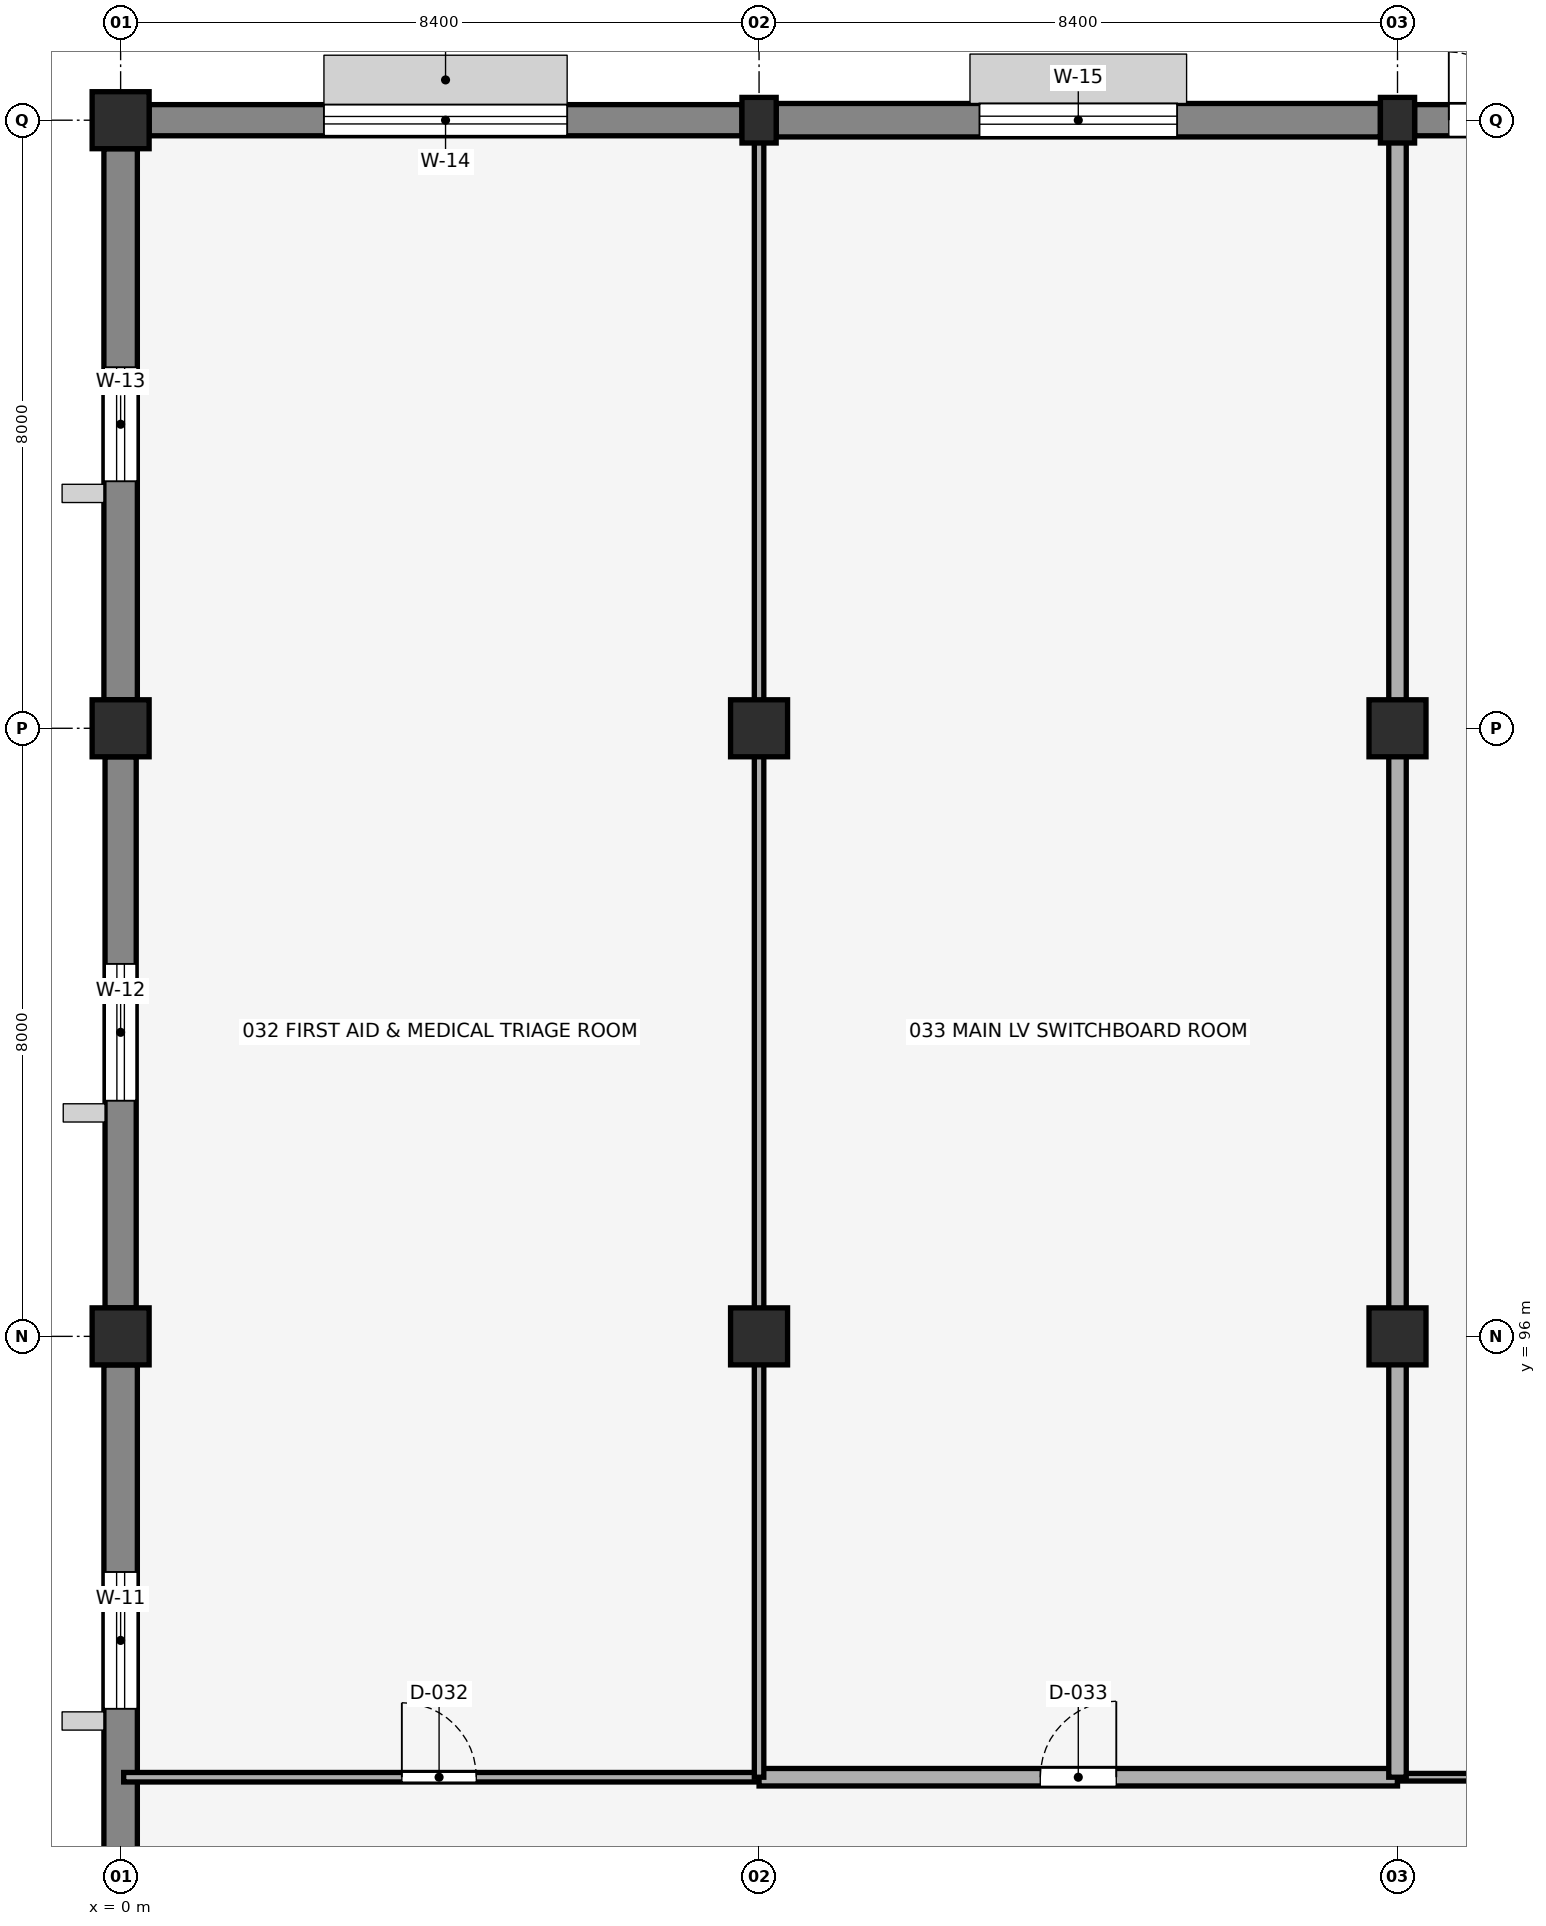
"""IFC4 building model, lengths in metres.
Left out: names, types, materials, properties, quantities, classifications, styles, units other than length and angle.
Written with IfcOpenShell. Run it as: python <this file> out.ifc"""

import sys

from ifc_helpers import new_model, si_unit, direction, frame, frame_2d, origin, origin_2d, place, context, subcontext, project, spatial, rectangle, extrude, element, fill, save


model = new_model("IFC4")
c1 = context("Model", 3, precision=1e-05, world=origin(), true_north=direction((0.0, 1.0)))
c2 = subcontext(c1, "Body", "Model", "MODEL_VIEW")
j1 = project(units=[si_unit("LENGTHUNIT", "METRE"), si_unit("PLANEANGLEUNIT", "RADIAN")], contexts=[c1])
p1 = place(None, origin())
s1 = spatial("IfcSite", under=j1, at=p1, CompositionType="ELEMENT")
p2 = place(p1, origin())
s2 = spatial("IfcBuilding", under=s1, at=p2, CompositionType="ELEMENT")
p3 = place(p2, origin())
s3 = spatial("IfcBuildingStorey", under=s2, at=p3, CompositionType="ELEMENT", Elevation=0.0)
for number, where, z_axis, x_axis in (
    (1, (0.0, 96.0, 0.0), (0.0, 0.0, 1.0), (1.0, 0.0, 0.0)),
    (2, (0.0, 104.0, 0.0), (0.0, 0.0, 1.0), (1.0, 0.0, 0.0)),
    (3, (0.0, 112.0, 0.0), (0.0, 0.0, 1.0), (1.0, 0.0, 0.0)),
    (4, (8.4, 96.0, 0.0), (0.0, 0.0, 1.0), (1.0, 0.0, 0.0)),
    (5, (8.4, 104.0, 0.0), (0.0, 0.0, 1.0), (1.0, 0.0, 0.0)),
):
    element("IfcColumn", number, at=place(p3, frame(where, z_axis=z_axis, x_axis=x_axis)), inside=s3, PredefinedType="COLUMN", context=c2, shape_type="SweptSolid", body=[
        extrude(rectangle(XDim=0.75, YDim=0.75, at=origin_2d()), origin(), (0.0, 0.0, 1.0), 5.15),
    ])
p4 = place(p3, frame((8.4, 112.0, 0.0), z_axis=(0.0, 0.0, 1.0), x_axis=(1.0, 0.0, 0.0)))
e6 = element("IfcColumn", 6, at=p4, inside=s3, PredefinedType="PILASTER", context=c2, shape_type="SweptSolid", body=[
    extrude(rectangle(XDim=0.45, YDim=0.6, at=origin_2d()), origin(), (0.0, 0.0, 1.0), 5.15),
])
for number, where, z_axis, x_axis in (
    (7, (16.8, 96.0, 0.0), (0.0, 0.0, 1.0), (1.0, 0.0, 0.0)),
    (8, (16.8, 104.0, 0.0), (0.0, 0.0, 1.0), (1.0, 0.0, 0.0)),
):
    element("IfcColumn", number, at=place(p3, frame(where, z_axis=z_axis, x_axis=x_axis)), inside=s3, PredefinedType="COLUMN", context=c2, shape_type="SweptSolid", body=[
        extrude(rectangle(XDim=0.75, YDim=0.75, at=origin_2d()), origin(), (0.0, 0.0, 1.0), 5.15),
    ])
p5 = place(p3, frame((16.8, 112.0, 0.0), z_axis=(0.0, 0.0, 1.0), x_axis=(1.0, 0.0, 0.0)))
e9 = element("IfcColumn", 9, at=p5, inside=s3, PredefinedType="PILASTER", context=c2, shape_type="SweptSolid", body=[
    extrude(rectangle(XDim=0.45, YDim=0.6, at=origin_2d()), origin(), (0.0, 0.0, 1.0), 5.15),
])
p6 = place(p3, frame((0.0, 88.375, 0.0), z_axis=(0.0, 0.0, 1.0), x_axis=(0.0, 1.0, 0.0)))
e10 = element("IfcWall", 10, at=p6, inside=s3, PredefinedType="SOLIDWALL", context=c2, shape_type="SweptSolid", body=[
    extrude(rectangle(XDim=7.25, YDim=0.44, at=frame_2d((3.625, 0.0))), origin(), (0.0, 0.0, 1.0), 4.747),
])
p7 = place(p6, frame((2.725, 0.0, 0.9), z_axis=(0.0, 0.0, 1.0), x_axis=(1.0, 0.0, 0.0)))
e11 = element("IfcOpeningElement", 11, at=p7, cuts=e10, PredefinedType="OPENING", context=c2, shape_type="SweptSolid", body=[
    extrude(rectangle(XDim=1.8, YDim=1.45, at=frame_2d((0.9, 0.725))), frame((0.0, 0.23, 0.0), z_axis=(0.0, -1.0, 0.0), x_axis=(1.0, 0.0, 0.0)), (0.0, 0.0, 1.0), 0.46),
])
p8 = place(p3, frame((0.0, 96.375, 0.0), z_axis=(0.0, 0.0, 1.0), x_axis=(0.0, 1.0, 0.0)))
e12 = element("IfcWall", 12, at=p8, inside=s3, PredefinedType="SOLIDWALL", context=c2, shape_type="SweptSolid", body=[
    extrude(rectangle(XDim=7.25, YDim=0.41, at=frame_2d((3.625, 0.0))), origin(), (0.0, 0.0, 1.0), 4.747),
])
p9 = place(p8, frame((2.725, 0.0, 0.9), z_axis=(0.0, 0.0, 1.0), x_axis=(1.0, 0.0, 0.0)))
e13 = element("IfcOpeningElement", 13, at=p9, cuts=e12, PredefinedType="OPENING", context=c2, shape_type="SweptSolid", body=[
    extrude(rectangle(XDim=1.8, YDim=1.3, at=frame_2d((0.9, 0.65))), frame((0.0, 0.215, 0.0), z_axis=(0.0, -1.0, 0.0), x_axis=(1.0, 0.0, 0.0)), (0.0, 0.0, 1.0), 0.43),
])
p10 = place(p3, frame((0.0, 104.375, 0.0), z_axis=(0.0, 0.0, 1.0), x_axis=(0.0, 1.0, 0.0)))
e14 = element("IfcWall", 14, at=p10, inside=s3, PredefinedType="SOLIDWALL", context=c2, shape_type="SweptSolid", body=[
    extrude(rectangle(XDim=7.25, YDim=0.44, at=frame_2d((3.625, 0.0))), origin(), (0.0, 0.0, 1.0), 4.747),
])
p11 = place(p10, frame((2.875, 0.0, 0.9), z_axis=(0.0, 0.0, 1.0), x_axis=(1.0, 0.0, 0.0)))
e15 = element("IfcOpeningElement", 15, at=p11, cuts=e14, PredefinedType="OPENING", context=c2, shape_type="SweptSolid", body=[
    extrude(rectangle(XDim=1.5, YDim=1.4, at=frame_2d((0.75, 0.7))), frame((0.0, 0.23, 0.0), z_axis=(0.0, -1.0, 0.0), x_axis=(1.0, 0.0, 0.0)), (0.0, 0.0, 1.0), 0.46),
])
p12 = place(p3, frame((0.375, 112.0, 0.0), z_axis=(0.0, 0.0, 1.0), x_axis=(1.0, 0.0, 0.0)))
e16 = element("IfcWall", 16, at=p12, inside=s3, PredefinedType="SOLIDWALL", context=c2, shape_type="SweptSolid", body=[
    extrude(rectangle(XDim=7.8, YDim=0.41, at=frame_2d((3.9, 0.0))), origin(), (0.0, 0.0, 1.0), 4.74),
])
p13 = place(p12, frame((2.3, 0.0, 1.55), z_axis=(0.0, 0.0, 1.0), x_axis=(1.0, 0.0, 0.0)))
e17 = element("IfcOpeningElement", 17, at=p13, cuts=e16, PredefinedType="OPENING", context=c2, shape_type="SweptSolid", body=[
    extrude(rectangle(XDim=3.2, YDim=0.9, at=frame_2d((1.6, 0.45))), frame((0.0, 0.215, 0.0), z_axis=(0.0, -1.0, 0.0), x_axis=(1.0, 0.0, 0.0)), (0.0, 0.0, 1.0), 0.43),
])
p14 = place(p3, frame((8.625, 112.0, 0.0), z_axis=(0.0, 0.0, 1.0), x_axis=(1.0, 0.0, 0.0)))
e18 = element("IfcWall", 18, at=p14, inside=s3, PredefinedType="SOLIDWALL", context=c2, shape_type="SweptSolid", body=[
    extrude(rectangle(XDim=7.95, YDim=0.44, at=frame_2d((3.975, 0.0))), origin(), (0.0, 0.0, 1.0), 4.74),
])
p15 = place(p14, frame((2.675, 0.0, 1.55), z_axis=(0.0, 0.0, 1.0), x_axis=(1.0, 0.0, 0.0)))
e19 = element("IfcOpeningElement", 19, at=p15, cuts=e18, PredefinedType="OPENING", context=c2, shape_type="SweptSolid", body=[
    extrude(rectangle(XDim=2.6, YDim=0.85, at=frame_2d((1.3, 0.425))), frame((0.0, 0.23, 0.0), z_axis=(0.0, -1.0, 0.0), x_axis=(1.0, 0.0, 0.0)), (0.0, 0.0, 1.0), 0.46),
])
p16 = place(p3, frame((17.025, 112.0, 0.0), z_axis=(0.0, 0.0, 1.0), x_axis=(1.0, 0.0, 0.0)))
e20 = element("IfcWall", 20, at=p16, inside=s3, PredefinedType="SOLIDWALL", context=c2, shape_type="SweptSolid", body=[
    extrude(rectangle(XDim=7.95, YDim=0.41, at=frame_2d((3.975, 0.0))), origin(), (0.0, 0.0, 1.0), 4.74),
])
p17 = place(p16, frame((0.45, 0.0, 0.0), z_axis=(0.0, 0.0, 1.0), x_axis=(1.0, 0.0, 0.0)))
e21 = element("IfcOpeningElement", 21, at=p17, cuts=e20, PredefinedType="OPENING", context=c2, shape_type="SweptSolid", body=[
    extrude(rectangle(XDim=1.8, YDim=2.2, at=frame_2d((0.9, 1.1))), frame((0.0, 0.215, 0.0), z_axis=(0.0, -1.0, 0.0), x_axis=(1.0, 0.0, 0.0)), (0.0, 0.0, 1.0), 0.43),
])
p18 = place(p3, frame((0.04, 90.2, 0.0), z_axis=(0.0, 0.0, 1.0), x_axis=(1.0, 0.0, 0.0)))
e22 = element("IfcWall", 22, at=p18, inside=s3, PredefinedType="PARTITIONING", context=c2, shape_type="SweptSolid", body=[
    extrude(rectangle(XDim=8.36, YDim=0.125, at=frame_2d((4.18, 0.0))), origin(), (0.0, 0.0, 1.0), 5.15),
])
p19 = place(p18, frame((3.66, 0.0, 0.0), z_axis=(0.0, 0.0, 1.0), x_axis=(1.0, 0.0, 0.0)))
e23 = element("IfcOpeningElement", 23, at=p19, cuts=e22, PredefinedType="OPENING", context=c2, shape_type="SweptSolid", body=[
    extrude(rectangle(XDim=0.98, YDim=2.15, at=frame_2d((0.49, 1.075))), frame((0.0, 0.073, 0.0), z_axis=(0.0, -1.0, 0.0), x_axis=(1.0, 0.0, 0.0)), (0.0, 0.0, 1.0), 0.145),
])
p20 = place(p3, frame((8.4, 90.2, 0.0), z_axis=(0.0, 0.0, 1.0), x_axis=(1.0, 0.0, 0.0)))
e24 = element("IfcWall", 24, at=p20, inside=s3, PredefinedType="PARTITIONING", context=c2, shape_type="SweptSolid", body=[
    extrude(rectangle(XDim=8.4, YDim=0.23, at=frame_2d((4.2, 0.0))), origin(), (0.0, 0.0, 1.0), 5.15),
])
p21 = place(p20, frame((3.7, 0.0, 0.0), z_axis=(0.0, 0.0, 1.0), x_axis=(1.0, 0.0, 0.0)))
e25 = element("IfcOpeningElement", 25, at=p21, cuts=e24, PredefinedType="OPENING", context=c2, shape_type="SweptSolid", body=[
    extrude(rectangle(XDim=1.0, YDim=2.15, at=frame_2d((0.5, 1.075))), frame((0.0, 0.125, 0.0), z_axis=(0.0, -1.0, 0.0), x_axis=(1.0, 0.0, 0.0)), (0.0, 0.0, 1.0), 0.25),
])
p22 = place(p3, frame((16.8, 90.2, 0.0), z_axis=(0.0, 0.0, 1.0), x_axis=(1.0, 0.0, 0.0)))
e26 = element("IfcWall", 26, at=p22, inside=s3, PredefinedType="PARTITIONING", context=c2, shape_type="SweptSolid", body=[
    extrude(rectangle(XDim=25.2, YDim=0.1, at=frame_2d((12.6, 0.0))), origin(), (0.0, 0.0, 1.0), 4.542),
])
p23 = place(p22, frame((3.7, 0.0, 0.0), z_axis=(0.0, 0.0, 1.0), x_axis=(1.0, 0.0, 0.0)))
e27 = element("IfcOpeningElement", 27, at=p23, cuts=e26, PredefinedType="OPENING", context=c2, shape_type="SweptSolid", body=[
    extrude(rectangle(XDim=0.92, YDim=2.12, at=frame_2d((0.46, 1.06))), frame((0.0, 0.06, 0.0), z_axis=(0.0, -1.0, 0.0), x_axis=(1.0, 0.0, 0.0)), (0.0, 0.0, 1.0), 0.12),
])
p24 = place(p3, frame((8.4, 90.2, 0.0), z_axis=(0.0, 0.0, 1.0), x_axis=(0.0, 1.0, 0.0)))
e28 = element("IfcWall", 28, at=p24, inside=s3, PredefinedType="PARTITIONING", context=c2, shape_type="SweptSolid", body=[
    extrude(rectangle(XDim=5.435, YDim=0.125, at=frame_2d((2.718, 0.0))), origin(), (0.0, 0.0, 1.0), 4.542),
])
p25 = place(p3, frame((8.4, 96.365, 0.0), z_axis=(0.0, 0.0, 1.0), x_axis=(0.0, 1.0, 0.0)))
e29 = element("IfcWall", 29, at=p25, inside=s3, PredefinedType="PARTITIONING", context=c2, shape_type="SweptSolid", body=[
    extrude(rectangle(XDim=7.27, YDim=0.125, at=frame_2d((3.635, 0.0))), origin(), (0.0, 0.0, 1.0), 4.542),
])
p26 = place(p3, frame((8.4, 104.365, 0.0), z_axis=(0.0, 0.0, 1.0), x_axis=(0.0, 1.0, 0.0)))
e30 = element("IfcWall", 30, at=p26, inside=s3, PredefinedType="PARTITIONING", context=c2, shape_type="SweptSolid", body=[
    extrude(rectangle(XDim=7.345, YDim=0.125, at=frame_2d((3.672, 0.0))), origin(), (0.0, 0.0, 1.0), 4.542),
])
p27 = place(p3, frame((16.8, 90.2, 0.0), z_axis=(0.0, 0.0, 1.0), x_axis=(0.0, 1.0, 0.0)))
e31 = element("IfcWall", 31, at=p27, inside=s3, PredefinedType="PARTITIONING", context=c2, shape_type="SweptSolid", body=[
    extrude(rectangle(XDim=5.435, YDim=0.23, at=frame_2d((2.718, 0.0))), origin(), (0.0, 0.0, 1.0), 4.542),
])
p28 = place(p3, frame((16.8, 96.365, 0.0), z_axis=(0.0, 0.0, 1.0), x_axis=(0.0, 1.0, 0.0)))
e32 = element("IfcWall", 32, at=p28, inside=s3, PredefinedType="PARTITIONING", context=c2, shape_type="SweptSolid", body=[
    extrude(rectangle(XDim=7.27, YDim=0.23, at=frame_2d((3.635, 0.0))), origin(), (0.0, 0.0, 1.0), 4.542),
])
p29 = place(p3, frame((16.8, 104.365, 0.0), z_axis=(0.0, 0.0, 1.0), x_axis=(0.0, 1.0, 0.0)))
e33 = element("IfcWall", 33, at=p29, inside=s3, PredefinedType="PARTITIONING", context=c2, shape_type="SweptSolid", body=[
    extrude(rectangle(XDim=7.345, YDim=0.23, at=frame_2d((3.672, 0.0))), origin(), (0.0, 0.0, 1.0), 4.542),
])
p30 = place(p7, origin())
e34 = element("IfcWindow", 34, at=p30, inside=s3, PartitioningType="DOUBLE_PANEL_VERTICAL", PredefinedType="WINDOW", context=c2, shape_type="SweptSolid", body=[
    extrude(rectangle(XDim=1.8, YDim=1.45, at=frame_2d((0.9, 0.725))), frame((0.0, 0.03, 0.0), z_axis=(0.0, -1.0, 0.0), x_axis=(1.0, 0.0, 0.0)), (0.0, 0.0, 1.0), 0.06),
])
fill(e11, e34)
p31 = place(p9, origin())
e35 = element("IfcWindow", 35, at=p31, inside=s3, PartitioningType="DOUBLE_PANEL_VERTICAL", PredefinedType="WINDOW", context=c2, shape_type="SweptSolid", body=[
    extrude(rectangle(XDim=1.8, YDim=1.3, at=frame_2d((0.9, 0.65))), frame((0.0, 0.03, 0.0), z_axis=(0.0, -1.0, 0.0), x_axis=(1.0, 0.0, 0.0)), (0.0, 0.0, 1.0), 0.06),
])
fill(e13, e35)
p32 = place(p11, origin())
e36 = element("IfcWindow", 36, at=p32, inside=s3, PartitioningType="SINGLE_PANEL", PredefinedType="WINDOW", context=c2, shape_type="SweptSolid", body=[
    extrude(rectangle(XDim=1.5, YDim=1.4, at=frame_2d((0.75, 0.7))), frame((0.0, 0.03, 0.0), z_axis=(0.0, -1.0, 0.0), x_axis=(1.0, 0.0, 0.0)), (0.0, 0.0, 1.0), 0.06),
])
fill(e15, e36)
p33 = place(p13, origin())
e37 = element("IfcWindow", 37, at=p33, inside=s3, PartitioningType="TRIPLE_PANEL_HORIZONTAL", PredefinedType="WINDOW", context=c2, shape_type="SweptSolid", body=[
    extrude(rectangle(XDim=3.2, YDim=0.9, at=frame_2d((1.6, 0.45))), frame((0.0, 0.03, 0.0), z_axis=(0.0, -1.0, 0.0), x_axis=(1.0, 0.0, 0.0)), (0.0, 0.0, 1.0), 0.06),
])
fill(e17, e37)
p34 = place(p15, origin())
e38 = element("IfcWindow", 38, at=p34, inside=s3, PartitioningType="DOUBLE_PANEL_HORIZONTAL", PredefinedType="WINDOW", context=c2, shape_type="SweptSolid", body=[
    extrude(rectangle(XDim=2.6, YDim=0.85, at=frame_2d((1.3, 0.425))), frame((0.0, 0.03, 0.0), z_axis=(0.0, -1.0, 0.0), x_axis=(1.0, 0.0, 0.0)), (0.0, 0.0, 1.0), 0.06),
])
fill(e19, e38)
p35 = place(p17, origin())
e39 = element("IfcDoor", 39, at=p35, inside=s3, OperationType="DOUBLE_DOOR_SINGLE_SWING", PredefinedType="DOOR", context=c2, shape_type="SweptSolid", body=[
    extrude(rectangle(XDim=1.8, YDim=2.2, at=frame_2d((0.9, 1.1))), frame((0.0, 0.025, 0.0), z_axis=(0.0, -1.0, 0.0), x_axis=(1.0, 0.0, 0.0)), (0.0, 0.0, 1.0), 0.05),
])
fill(e21, e39)
p36 = place(p19, origin())
e40 = element("IfcDoor", 40, at=p36, inside=s3, OperationType="SINGLE_SWING_LEFT", PredefinedType="DOOR", context=c2, shape_type="SweptSolid", body=[
    extrude(rectangle(XDim=0.98, YDim=2.15, at=frame_2d((0.49, 1.075))), frame((0.0, 0.025, 0.0), z_axis=(0.0, -1.0, 0.0), x_axis=(1.0, 0.0, 0.0)), (0.0, 0.0, 1.0), 0.05),
])
fill(e23, e40)
p37 = place(p21, origin())
e41 = element("IfcDoor", 41, at=p37, inside=s3, OperationType="SINGLE_SWING_RIGHT", PredefinedType="DOOR", context=c2, shape_type="SweptSolid", body=[
    extrude(rectangle(XDim=1.0, YDim=2.15, at=frame_2d((0.5, 1.075))), frame((0.0, 0.025, 0.0), z_axis=(0.0, -1.0, 0.0), x_axis=(1.0, 0.0, 0.0)), (0.0, 0.0, 1.0), 0.05),
])
fill(e25, e41)
save(model, sys.argv[1])
